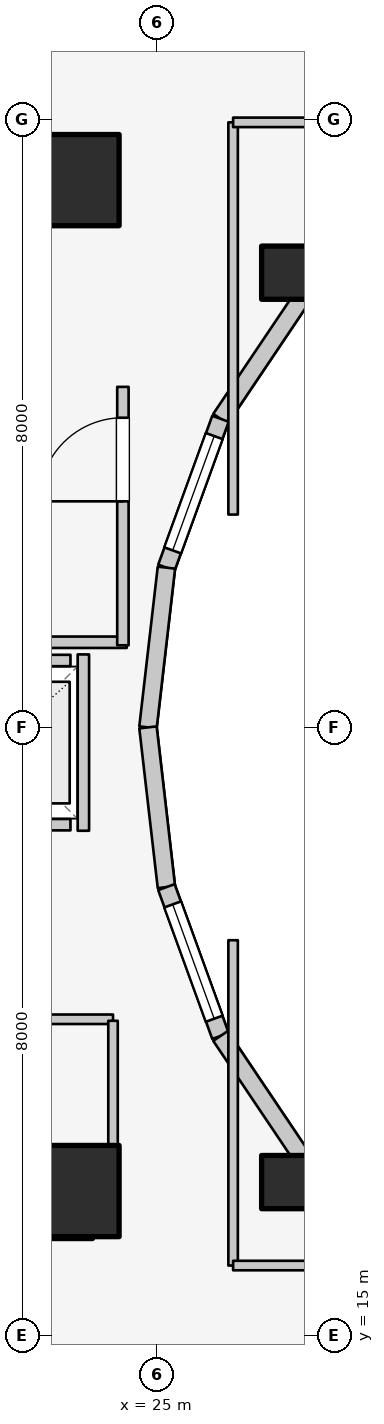
"""IFC4 building model, lengths in metres.
Left out: names, types, materials, properties, quantities, classifications, styles, units other than length and angle.
Written with IfcOpenShell. Run it as: python <this file> out.ifc"""

import sys

from ifc_helpers import new_model, si_unit, direction, frame, frame_2d, origin, origin_2d, place, context, subcontext, project, spatial, rectangle, extrude, element, fill, save


model = new_model("IFC4")
c1 = context("Model", 3, precision=1e-05, world=origin(), true_north=direction((0.0, 1.0)))
c2 = subcontext(c1, "Body", "Model", "MODEL_VIEW")
j1 = project(units=[si_unit("LENGTHUNIT", "METRE"), si_unit("PLANEANGLEUNIT", "RADIAN")], contexts=[c1])
p1 = place(None, origin())
s1 = spatial("IfcSite", under=j1, at=p1, CompositionType="ELEMENT")
p2 = place(p1, origin())
s2 = spatial("IfcBuilding", under=s1, at=p2, CompositionType="ELEMENT")
p3 = place(p2, frame((0.0, 0.0, 220.2)))
s3 = spatial("IfcBuildingStorey", under=s2, at=p3, CompositionType="ELEMENT", Elevation=220.2)
for number, where, z_axis, x_axis in (
    (1, (19.65, 16.55, 0.0), (0.0, 0.0, 1.0), (1.0, 0.0, 0.0)),
    (2, (19.65, 30.35, 0.0), (0.0, 0.0, 1.0), (1.0, 0.0, 0.0)),
):
    element("IfcWall", number, at=place(p3, frame(where, z_axis=z_axis, x_axis=x_axis)), inside=s3, PredefinedType="SHEAR", context=c2, shape_type="SweptSolid", body=[
        extrude(rectangle(XDim=4.5, YDim=0.55, at=frame_2d((2.25, 0.0))), origin(), (0.0, 0.0, 1.0), 3.1),
    ])
for number, where, z_axis, x_axis in (
    (3, (23.9, 16.9, 0.0), (0.0, 0.0, 1.0), (1.0, 0.0, 0.0)),
    (4, (23.9, 30.2, 0.0), (0.0, 0.0, 1.0), (1.0, 0.0, 0.0)),
):
    element("IfcColumn", number, at=place(p3, frame(where, z_axis=z_axis, x_axis=x_axis)), inside=s3, PredefinedType="COLUMN", context=c2, shape_type="SweptSolid", body=[
        extrude(rectangle(XDim=1.2, YDim=1.2, at=origin_2d()), origin(), (0.0, 0.0, 1.0), 3.1),
    ])
for number, where, z_axis, x_axis in (
    (5, (26.725, 28.982, 0.0), (0.0, 0.0, 1.0), (1.0, 0.0, 0.0)),
    (6, (26.725, 17.018, 0.0), (0.0, 0.0, 1.0), (1.0, 0.0, 0.0)),
):
    element("IfcColumn", number, at=place(p3, frame(where, z_axis=z_axis, x_axis=x_axis)), inside=s3, PredefinedType="COLUMN", context=c2, shape_type="SweptSolid", body=[
        extrude(rectangle(XDim=0.7, YDim=0.7, at=origin_2d()), origin(), (0.0, 0.0, 1.0), 3.1),
    ])
p4 = place(p3, frame((28.44, 30.032, 0.0), z_axis=(0.0, 0.0, 1.0), x_axis=(-0.752576694707, -0.658504607869, 0.0)))
e7 = element("IfcWall", 7, at=p4, inside=s3, PredefinedType="STANDARD", context=c2, shape_type="SweptSolid", body=[
    extrude(rectangle(XDim=1.959, YDim=0.23, at=frame_2d((0.98, 0.0))), origin(), (0.0, 0.0, 1.0), 2.16),
])
p5 = place(p3, frame((26.965, 28.742, 0.0), z_axis=(0.0, 0.0, 1.0), x_axis=(-0.558197800898, -0.829707909492, 0.0)))
e8 = element("IfcWall", 8, at=p5, inside=s3, PredefinedType="STANDARD", context=c2, shape_type="SweptSolid", body=[
    extrude(rectangle(XDim=2.027, YDim=0.23, at=frame_2d((1.013, 0.0))), origin(), (0.0, 0.0, 1.0), 2.16),
])
p6 = place(p3, frame((25.834, 27.06, 0.0), z_axis=(0.0, 0.0, 1.0), x_axis=(-0.341423187295, -0.93990968033, 0.0)))
e9 = element("IfcWall", 9, at=p6, inside=s3, PredefinedType="STANDARD", context=c2, shape_type="SweptSolid", body=[
    extrude(rectangle(XDim=2.084, YDim=0.23, at=frame_2d((1.042, 0.0))), origin(), (0.0, 0.0, 1.0), 2.84),
])
p7 = place(p6, frame((0.242, 0.0, 0.85)))
e10 = element("IfcOpeningElement", 10, at=p7, cuts=e9, PredefinedType="OPENING", context=c2, shape_type="SweptSolid", body=[
    extrude(rectangle(XDim=1.6, YDim=1.65, at=frame_2d((0.8, 0.825))), frame((0.0, 0.125, 0.0), z_axis=(0.0, -1.0, 0.0), x_axis=(1.0, 0.0, 0.0)), (0.0, 0.0, 1.0), 0.25),
])
for number, where, z_axis, x_axis in (
    (11, (25.123, 25.102, 0.0), (0.0, 0.0, 1.0), (-0.115, -0.993, 0.0)),
    (12, (24.88, 23.0, 0.0), (0.0, 0.0, 1.0), (0.115, -0.993, 0.0)),
):
    element("IfcWall", number, at=place(p3, frame(where, z_axis=z_axis, x_axis=x_axis)), inside=s3, PredefinedType="STANDARD", context=c2, shape_type="SweptSolid", body=[
        extrude(rectangle(XDim=2.115, YDim=0.23, at=frame_2d((1.058, 0.0))), origin(), (0.0, 0.0, 1.0), 2.84),
    ])
p8 = place(p3, frame((25.123, 20.898, 0.0), z_axis=(0.0, 0.0, 1.0), x_axis=(0.341423187295, -0.93990968033, 0.0)))
e13 = element("IfcWall", 13, at=p8, inside=s3, PredefinedType="STANDARD", context=c2, shape_type="SweptSolid", body=[
    extrude(rectangle(XDim=2.084, YDim=0.23, at=frame_2d((1.042, 0.0))), origin(), (0.0, 0.0, 1.0), 2.84),
])
p9 = place(p8, frame((0.242, 0.0, 0.85)))
e14 = element("IfcOpeningElement", 14, at=p9, cuts=e13, PredefinedType="OPENING", context=c2, shape_type="SweptSolid", body=[
    extrude(rectangle(XDim=1.6, YDim=1.65, at=frame_2d((0.8, 0.825))), frame((0.0, 0.125, 0.0), z_axis=(0.0, -1.0, 0.0), x_axis=(1.0, 0.0, 0.0)), (0.0, 0.0, 1.0), 0.25),
])
p10 = place(p3, frame((25.834, 18.94, 0.0), z_axis=(0.0, 0.0, 1.0), x_axis=(0.558197800898, -0.829707909492, 0.0)))
e15 = element("IfcWall", 15, at=p10, inside=s3, PredefinedType="STANDARD", context=c2, shape_type="SweptSolid", body=[
    extrude(rectangle(XDim=2.027, YDim=0.23, at=frame_2d((1.013, 0.0))), origin(), (0.0, 0.0, 1.0), 2.16),
])
p11 = place(p3, frame((26.965, 17.258, 0.0), z_axis=(0.0, 0.0, 1.0), x_axis=(0.752576694707, -0.658504607869, 0.0)))
e16 = element("IfcWall", 16, at=p11, inside=s3, PredefinedType="STANDARD", context=c2, shape_type="SweptSolid", body=[
    extrude(rectangle(XDim=1.959, YDim=0.23, at=frame_2d((0.98, 0.0))), origin(), (0.0, 0.0, 1.0), 2.16),
])
p12 = place(p3, frame((22.04, 21.72, 0.0), z_axis=(0.0, 0.0, 1.0), x_axis=(1.0, 0.0, 0.0)))
e17 = element("IfcWall", 17, at=p12, inside=s3, PredefinedType="SOLIDWALL", context=c2, shape_type="SweptSolid", body=[
    extrude(rectangle(XDim=1.82, YDim=0.15, at=frame_2d((0.91, 0.0))), origin(), (0.0, 0.0, 1.0), 2.12),
])
p13 = place(p12, frame((0.36, 0.0, 0.0)))
e18 = element("IfcOpeningElement", 18, at=p13, cuts=e17, PredefinedType="OPENING", context=c2, shape_type="SweptSolid", body=[
    extrude(rectangle(XDim=1.1, YDim=2.1, at=frame_2d((0.55, 1.05))), frame((0.0, 0.085, 0.0), z_axis=(0.0, -1.0, 0.0), x_axis=(1.0, 0.0, 0.0)), (0.0, 0.0, 1.0), 0.17),
])
p14 = place(p3, frame((22.04, 23.88, 0.0), z_axis=(0.0, 0.0, 1.0), x_axis=(1.0, 0.0, 0.0)))
e19 = element("IfcWall", 19, at=p14, inside=s3, PredefinedType="SOLIDWALL", context=c2, shape_type="SweptSolid", body=[
    extrude(rectangle(XDim=1.82, YDim=0.15, at=frame_2d((0.91, 0.0))), origin(), (0.0, 0.0, 1.0), 2.12),
])
p15 = place(p3, frame((24.03, 21.64, 0.0), z_axis=(0.0, 0.0, 1.0), x_axis=(0.0, 1.0, 0.0)))
e20 = element("IfcWall", 20, at=p15, inside=s3, PredefinedType="SOLIDWALL", context=c2, shape_type="SweptSolid", body=[
    extrude(rectangle(XDim=2.32, YDim=0.15, at=frame_2d((1.16, 0.0))), origin(), (0.0, 0.0, 1.0), 2.12),
])
p16 = place(p3, frame((19.52, 24.12, 0.0), z_axis=(0.0, 0.0, 1.0), x_axis=(1.0, 0.0, 0.0)))
e21 = element("IfcWall", 21, at=p16, inside=s3, PredefinedType="PARTITIONING", context=c2, shape_type="SweptSolid", body=[
    extrude(rectangle(XDim=5.08, YDim=0.15, at=frame_2d((2.54, 0.0))), origin(), (0.0, 0.0, 1.0), 2.12),
])
p17 = place(p3, frame((24.55, 24.08, 0.0), z_axis=(0.0, 0.0, 1.0), x_axis=(0.0, 1.0, 0.0)))
e22 = element("IfcWall", 22, at=p17, inside=s3, PredefinedType="PARTITIONING", context=c2, shape_type="SweptSolid", body=[
    extrude(rectangle(XDim=3.4, YDim=0.15, at=frame_2d((1.7, 0.0))), origin(), (0.0, 0.0, 1.0), 2.855),
])
p18 = place(p17, frame((1.894, 0.0, 0.0)))
e23 = element("IfcOpeningElement", 23, at=p18, cuts=e22, PredefinedType="OPENING", context=c2, shape_type="SweptSolid", body=[
    extrude(rectangle(XDim=1.1, YDim=2.1, at=frame_2d((0.55, 1.05))), frame((0.0, 0.085, 0.0), z_axis=(0.0, -1.0, 0.0), x_axis=(1.0, 0.0, 0.0)), (0.0, 0.0, 1.0), 0.17),
])
p19 = place(p3, frame((19.55, 19.16, 0.0), z_axis=(0.0, 0.0, 1.0), x_axis=(1.0, 0.0, 0.0)))
e24 = element("IfcWall", 24, at=p19, inside=s3, PredefinedType="PARTITIONING", context=c2, shape_type="SweptSolid", body=[
    extrude(rectangle(XDim=4.87, YDim=0.125, at=frame_2d((2.435, 0.0))), origin(), (0.0, 0.0, 1.0), 2.12),
])
p20 = place(p19, frame((2.272, 0.0, 0.0)))
e25 = element("IfcOpeningElement", 25, at=p20, cuts=e24, PredefinedType="OPENING", context=c2, shape_type="SweptSolid", body=[
    extrude(rectangle(XDim=0.85, YDim=2.05, at=frame_2d((0.425, 1.025))), frame((0.0, 0.073, 0.0), z_axis=(0.0, -1.0, 0.0), x_axis=(1.0, 0.0, 0.0)), (0.0, 0.0, 1.0), 0.145),
])
p21 = place(p3, frame((24.42, 17.1, 0.0), z_axis=(0.0, 0.0, 1.0), x_axis=(0.0, 1.0, 0.0)))
e26 = element("IfcWall", 26, at=p21, inside=s3, PredefinedType="PARTITIONING", context=c2, shape_type="SweptSolid", body=[
    extrude(rectangle(XDim=2.04, YDim=0.125, at=frame_2d((1.02, 0.0))), origin(), (0.0, 0.0, 1.0), 2.232),
])
p22 = place(p3, frame((28.45, 30.015, 0.0), z_axis=(0.0, 0.0, 1.0), x_axis=(-0.523992004803, 0.851723182086, 0.0)))
e27 = element("IfcWall", 27, at=p22, inside=s3, PredefinedType="PARTITIONING", context=c2, shape_type="SweptSolid", body=[
    extrude(rectangle(XDim=3.101, YDim=0.125, at=frame_2d((1.551, 0.0))), origin(), (0.0, 0.0, 1.0), 2.376),
])
p23 = place(p3, frame((26.0, 25.8, 0.0), z_axis=(0.0, 0.0, 1.0), x_axis=(0.0, 1.0, 0.0)))
e28 = element("IfcWall", 28, at=p23, inside=s3, PredefinedType="PARTITIONING", context=c2, shape_type="SweptSolid", body=[
    extrude(rectangle(XDim=5.16, YDim=0.125, at=frame_2d((2.58, 0.0))), origin(), (0.0, 0.0, 1.0), 2.232),
])
p24 = place(p3, frame((26.0, 30.96, 0.0), z_axis=(0.0, 0.0, 1.0), x_axis=(1.0, 0.0, 0.0)))
e29 = element("IfcWall", 29, at=p24, inside=s3, PredefinedType="PARTITIONING", context=c2, shape_type="SweptSolid", body=[
    extrude(rectangle(XDim=2.6, YDim=0.125, at=frame_2d((1.3, 0.0))), origin(), (0.0, 0.0, 1.0), 2.376),
])
p25 = place(p3, frame((26.0, 15.92, 0.0), z_axis=(0.0, 0.0, 1.0), x_axis=(0.0, 1.0, 0.0)))
e30 = element("IfcWall", 30, at=p25, inside=s3, PredefinedType="PARTITIONING", context=c2, shape_type="SweptSolid", body=[
    extrude(rectangle(XDim=4.28, YDim=0.125, at=frame_2d((2.14, 0.0))), origin(), (0.0, 0.0, 1.0), 2.232),
])
p26 = place(p3, frame((26.0, 15.92, 0.0), z_axis=(0.0, 0.0, 1.0), x_axis=(1.0, 0.0, 0.0)))
e31 = element("IfcWall", 31, at=p26, inside=s3, PredefinedType="PARTITIONING", context=c2, shape_type="SweptSolid", body=[
    extrude(rectangle(XDim=2.6, YDim=0.125, at=frame_2d((1.3, 0.0))), origin(), (0.0, 0.0, 1.0), 2.232),
])
p27 = place(p7, origin())
e32 = element("IfcWindow", 32, at=p27, inside=s3, PartitioningType="SINGLE_PANEL", PredefinedType="WINDOW", context=c2, shape_type="SweptSolid", body=[
    extrude(rectangle(XDim=1.6, YDim=1.65, at=frame_2d((0.8, 0.825))), frame((0.0, 0.03, 0.0), z_axis=(0.0, -1.0, 0.0), x_axis=(1.0, 0.0, 0.0)), (0.0, 0.0, 1.0), 0.06),
])
fill(e10, e32)
p28 = place(p9, origin())
e33 = element("IfcWindow", 33, at=p28, inside=s3, PartitioningType="SINGLE_PANEL", PredefinedType="WINDOW", context=c2, shape_type="SweptSolid", body=[
    extrude(rectangle(XDim=1.6, YDim=1.65, at=frame_2d((0.8, 0.825))), frame((0.0, 0.03, 0.0), z_axis=(0.0, -1.0, 0.0), x_axis=(1.0, 0.0, 0.0)), (0.0, 0.0, 1.0), 0.06),
])
fill(e14, e33)
p29 = place(p18, origin())
e34 = element("IfcDoor", 34, at=p29, inside=s3, OperationType="SINGLE_SWING_LEFT", PredefinedType="DOOR", context=c2, shape_type="SweptSolid", body=[
    extrude(rectangle(XDim=1.1, YDim=2.1, at=frame_2d((0.55, 1.05))), frame((0.0, 0.025, 0.0), z_axis=(0.0, -1.0, 0.0), x_axis=(1.0, 0.0, 0.0)), (0.0, 0.0, 1.0), 0.05),
])
fill(e23, e34)
save(model, sys.argv[1])
